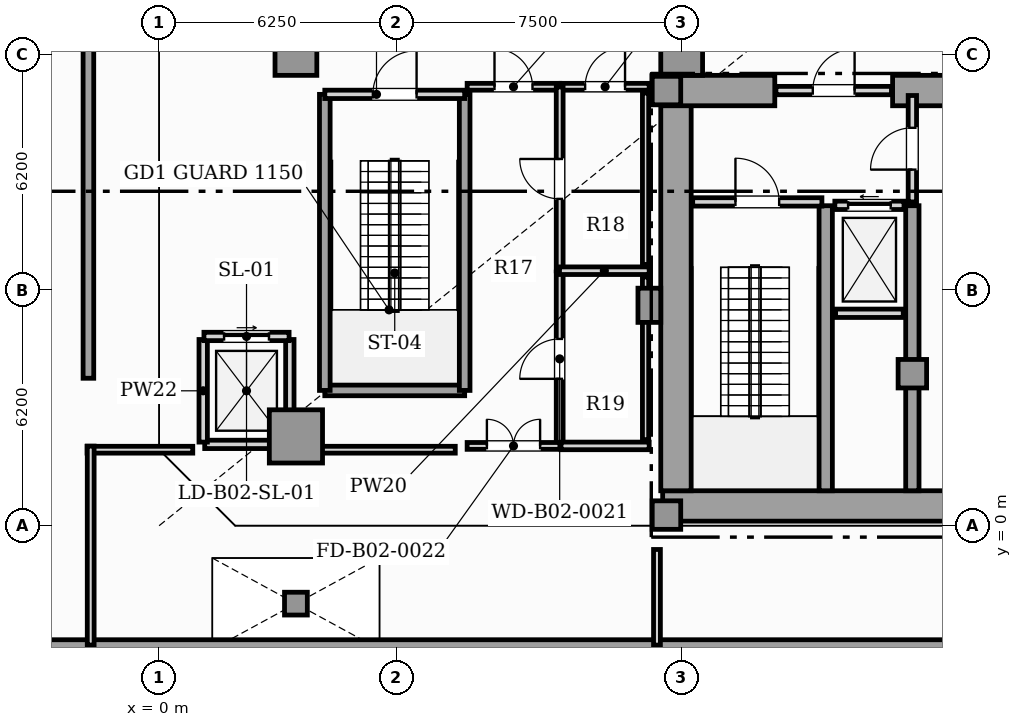
"""IFC4 building model, lengths in metres.
Left out: names, types, materials, properties, quantities, classifications, styles, units other than length and angle.
Written with IfcOpenShell. Run it as: python <this file> out.ifc"""

import sys

from ifc_helpers import new_model, si_unit, direction, frame, frame_2d, origin, origin_2d, place, context, subcontext, project, spatial, rectangle, hollow_rectangle, extrude, element, fill, save


model = new_model("IFC4")
c1 = context("Model", 3, precision=1e-05, world=origin(), true_north=direction((0.0, 1.0)))
c2 = subcontext(c1, "Body", "Model", "MODEL_VIEW")
j1 = project(units=[si_unit("LENGTHUNIT", "METRE"), si_unit("PLANEANGLEUNIT", "RADIAN")], contexts=[c1])
p1 = place(None, origin())
s1 = spatial("IfcSite", under=j1, at=p1, CompositionType="ELEMENT")
p2 = place(p1, origin())
s2 = spatial("IfcBuilding", under=s1, at=p2, CompositionType="ELEMENT")
p3 = place(p2, frame((0.0, 0.0, -10.8)))
s3 = spatial("IfcBuildingStorey", under=s2, at=p3, CompositionType="ELEMENT", Elevation=-10.8)
p4 = place(p3, frame((13.25, 0.52, 0.0), z_axis=(0.0, 0.0, 1.0), x_axis=(1.0, 0.0, 0.0)))
e1 = element("IfcWall", 1, at=p4, inside=s3, PredefinedType="SHEAR", context=c2, shape_type="SweptSolid", body=[
    extrude(rectangle(XDim=31.0, YDim=0.8, at=frame_2d((15.5, 0.0))), origin(), (0.0, 0.0, 1.0), 5.05),
])
p5 = place(p3, frame((13.6, 0.92, 0.0), z_axis=(0.0, 0.0, 1.0), x_axis=(0.0, 1.0, 0.0)))
e2 = element("IfcWall", 2, at=p5, inside=s3, PredefinedType="SHEAR", context=c2, shape_type="SweptSolid", body=[
    extrude(rectangle(XDim=10.53, YDim=0.8, at=frame_2d((5.265, 0.0))), origin(), (0.0, 0.0, 1.0), 5.05),
])
p6 = place(p3, frame((13.25, 11.45, 0.0), z_axis=(0.0, 0.0, 1.0), x_axis=(1.0, 0.0, 0.0)))
e3 = element("IfcWall", 3, at=p6, inside=s3, PredefinedType="SHEAR", context=c2, shape_type="SweptSolid", body=[
    extrude(rectangle(XDim=2.95, YDim=0.8, at=frame_2d((1.475, 0.0))), origin(), (0.0, 0.0, 1.0), 5.05),
])
p7 = place(p3, frame((19.3, 11.45, 0.0), z_axis=(0.0, 0.0, 1.0), x_axis=(1.0, 0.0, 0.0)))
e4 = element("IfcWall", 4, at=p7, inside=s3, PredefinedType="SHEAR", context=c2, shape_type="SweptSolid", body=[
    extrude(rectangle(XDim=7.3, YDim=0.8, at=frame_2d((3.65, 0.0))), origin(), (0.0, 0.0, 1.0), 5.05),
])
for number, where, z_axis, x_axis in (
    (5, (17.54, 0.92, 0.0), (0.0, 0.0, 1.0), (0.0, 1.0, 0.0)),
    (6, (19.82, 0.92, 0.0), (0.0, 0.0, 1.0), (0.0, 1.0, 0.0)),
):
    element("IfcWall", number, at=place(p3, frame(where, z_axis=z_axis, x_axis=x_axis)), inside=s3, PredefinedType="SHEAR", context=c2, shape_type="SweptSolid", body=[
        extrude(rectangle(XDim=7.5, YDim=0.35, at=frame_2d((3.75, 0.0))), origin(), (0.0, 0.0, 1.0), 5.05),
    ])
p8 = place(p3, frame((12.9, 5.8, 0.0), z_axis=(0.0, 0.0, 1.0), x_axis=(1.0, 0.0, 0.0)))
e7 = element("IfcColumn", 7, at=p8, inside=s3, PredefinedType="PILASTER", context=c2, shape_type="SweptSolid", body=[
    extrude(rectangle(XDim=0.6, YDim=0.9, at=origin_2d()), origin(), (0.0, 0.0, 1.0), 5.4),
])
p9 = place(p3, frame((-7.9, -3.3, 0.0), z_axis=(0.0, 0.0, 1.0), x_axis=(1.0, 0.0, 0.0)))
e8 = element("IfcWall", 8, at=p9, inside=s3, PredefinedType="SOLIDWALL", context=c2, shape_type="SweptSolid", body=[
    extrude(rectangle(XDim=74.6, YDim=0.6, at=frame_2d((37.3, 0.0))), origin(), (0.0, 0.0, 1.0), 5.05),
])
p10 = place(p3, frame((-1.86, 3.88, 0.0), z_axis=(0.0, 0.0, 1.0), x_axis=(0.0, 1.0, 0.0)))
e9 = element("IfcWall", 9, at=p10, inside=s3, PredefinedType="SHEAR", context=c2, shape_type="SweptSolid", body=[
    extrude(rectangle(XDim=34.27, YDim=0.28, at=frame_2d((17.135, 0.0))), origin(), (0.0, 0.0, 1.0), 5.05),
])
for number, where, z_axis, x_axis in (
    (10, (13.35, 0.28, 0.0), (0.0, 0.0, 1.0), (1.0, 0.0, 0.0)),
    (11, (13.35, 11.45, 0.0), (0.0, 0.0, 1.0), (1.0, 0.0, 0.0)),
    (12, (19.82, 4.0, 0.0), (0.0, 0.0, 1.0), (1.0, 0.0, 0.0)),
):
    element("IfcColumn", number, at=place(p3, frame(where, z_axis=z_axis, x_axis=x_axis)), inside=s3, PredefinedType="COLUMN", context=c2, shape_type="SweptSolid", body=[
        extrude(rectangle(XDim=0.75, YDim=0.75, at=origin_2d()), origin(), (0.0, 0.0, 1.0), 5.4),
    ])
p11 = place(p3, frame((3.6, 2.35, 0.0), z_axis=(0.0, 0.0, 1.0), x_axis=(1.0, 0.0, 0.0)))
e13 = element("IfcColumn", 13, at=p11, inside=s3, PredefinedType="USERDEFINED", context=c2, shape_type="SweptSolid", body=[
    extrude(hollow_rectangle(XDim=1.4, YDim=1.4, WallThickness=0.08, at=origin_2d()), origin(), (0.0, 0.0, 1.0), 5.4),
])
for number, where, z_axis, x_axis in (
    (14, (3.6, 12.4, 0.0), (0.0, 0.0, 1.0), (1.0, 0.0, 0.0)),
    (15, (13.75, 12.4, 0.0), (0.0, 0.0, 1.0), (1.0, 0.0, 0.0)),
):
    element("IfcColumn", number, at=place(p3, frame(where, z_axis=z_axis, x_axis=x_axis)), inside=s3, PredefinedType="COLUMN", context=c2, shape_type="SweptSolid", body=[
        extrude(rectangle(XDim=1.1, YDim=1.1, at=origin_2d()), origin(), (0.0, 0.0, 1.0), 5.4),
    ])
p12 = place(p3, frame((3.6, -2.05, 0.0), z_axis=(0.0, 0.0, 1.0), x_axis=(1.0, 0.0, 0.0)))
e16 = element("IfcColumn", 16, at=p12, inside=s3, PredefinedType="COLUMN", context=c2, shape_type="SweptSolid", body=[
    extrude(hollow_rectangle(XDim=0.6, YDim=0.6, WallThickness=0.04, at=origin_2d()), origin(), (0.0, 0.0, 1.0), 5.4),
])
p13 = place(p3, frame((17.8, 5.59, 0.0), z_axis=(0.0, 0.0, 1.0), x_axis=(1.0, 0.0, 0.0)))
e17 = element("IfcWall", 17, at=p13, inside=s3, PredefinedType="SOLIDWALL", context=c2, shape_type="SweptSolid", body=[
    extrude(rectangle(XDim=1.78, YDim=0.22, at=frame_2d((0.89, 0.0))), origin(), (0.0, 0.0, 1.0), 5.05),
])
p14 = place(p3, frame((17.78, 8.43, 0.0), z_axis=(0.0, 0.0, 1.0), x_axis=(1.0, 0.0, 0.0)))
e18 = element("IfcWall", 18, at=p14, inside=s3, PredefinedType="SOLIDWALL", context=c2, shape_type="SweptSolid", body=[
    extrude(rectangle(XDim=1.82, YDim=0.22, at=frame_2d((0.91, 0.0))), origin(), (0.0, 0.0, 1.0), 5.05),
])
p15 = place(p14, frame((0.35, 0.0, 0.0)))
e19 = element("IfcOpeningElement", 19, at=p15, cuts=e18, PredefinedType="OPENING", context=c2, shape_type="SweptSolid", body=[
    extrude(rectangle(XDim=1.12, YDim=2.25, at=frame_2d((0.56, 1.125))), frame((0.0, 0.12, 0.0), z_axis=(0.0, -1.0, 0.0), x_axis=(1.0, 0.0, 0.0)), (0.0, 0.0, 1.0), 0.24),
])
p16 = place(p3, frame((1.2, 2.14, 0.0), z_axis=(0.0, 0.0, 1.0), x_axis=(1.0, 0.0, 0.0)))
e20 = element("IfcWall", 20, at=p16, inside=s3, PredefinedType="SOLIDWALL", context=c2, shape_type="SweptSolid", body=[
    extrude(rectangle(XDim=2.2, YDim=0.22, at=frame_2d((1.1, 0.0))), origin(), (0.0, 0.0, 1.0), 5.05),
])
p17 = place(p3, frame((1.16, 2.2, 0.0), z_axis=(0.0, 0.0, 1.0), x_axis=(0.0, 1.0, 0.0)))
e21 = element("IfcWall", 21, at=p17, inside=s3, PredefinedType="SOLIDWALL", context=c2, shape_type="SweptSolid", body=[
    extrude(rectangle(XDim=2.7, YDim=0.22, at=frame_2d((1.35, 0.0))), origin(), (0.0, 0.0, 1.0), 5.05),
])
p18 = place(p3, frame((3.44, 2.2, 0.0), z_axis=(0.0, 0.0, 1.0), x_axis=(0.0, 1.0, 0.0)))
e22 = element("IfcWall", 22, at=p18, inside=s3, PredefinedType="SOLIDWALL", context=c2, shape_type="SweptSolid", body=[
    extrude(rectangle(XDim=2.7, YDim=0.22, at=frame_2d((1.35, 0.0))), origin(), (0.0, 0.0, 1.0), 4.433),
])
p19 = place(p3, frame((1.18, 4.98, 0.0), z_axis=(0.0, 0.0, 1.0), x_axis=(1.0, 0.0, 0.0)))
e23 = element("IfcWall", 23, at=p19, inside=s3, PredefinedType="SOLIDWALL", context=c2, shape_type="SweptSolid", body=[
    extrude(rectangle(XDim=2.24, YDim=0.22, at=frame_2d((1.12, 0.0))), origin(), (0.0, 0.0, 1.0), 5.05),
])
p20 = place(p19, frame((0.53, 0.0, 0.0)))
e24 = element("IfcOpeningElement", 24, at=p20, cuts=e23, PredefinedType="OPENING", context=c2, shape_type="SweptSolid", body=[
    extrude(rectangle(XDim=1.18, YDim=2.2, at=frame_2d((0.59, 1.1))), frame((0.0, 0.12, 0.0), z_axis=(0.0, -1.0, 0.0), x_axis=(1.0, 0.0, 0.0)), (0.0, 0.0, 1.0), 0.24),
])
p21 = place(p3, frame((14.04, 8.52, 0.0), z_axis=(0.0, 0.0, 1.0), x_axis=(1.0, 0.0, 0.0)))
e25 = element("IfcWall", 25, at=p21, inside=s3, PredefinedType="SOLIDWALL", context=c2, shape_type="SweptSolid", body=[
    extrude(rectangle(XDim=3.4, YDim=0.22, at=frame_2d((1.7, 0.0))), origin(), (0.0, 0.0, 1.0), 5.05),
])
p22 = place(p21, frame((1.125, 0.0, 0.0)))
e26 = element("IfcOpeningElement", 26, at=p22, cuts=e25, PredefinedType="OPENING", context=c2, shape_type="SweptSolid", body=[
    extrude(rectangle(XDim=1.15, YDim=2.2, at=frame_2d((0.575, 1.1))), frame((0.0, 0.12, 0.0), z_axis=(0.0, -1.0, 0.0), x_axis=(1.0, 0.0, 0.0)), (0.0, 0.0, 1.0), 0.24),
])
p23 = place(p3, frame((4.36, 3.56, 0.0), z_axis=(0.0, 0.0, 1.0), x_axis=(1.0, 0.0, 0.0)))
e27 = element("IfcWall", 27, at=p23, inside=s3, PredefinedType="SHEAR", context=c2, shape_type="SweptSolid", body=[
    extrude(rectangle(XDim=3.68, YDim=0.28, at=frame_2d((1.84, 0.0))), origin(), (0.0, 0.0, 1.0), 5.05),
])
for number, where, z_axis, x_axis in (
    (28, (4.36, 3.56, 0.0), (0.0, 0.0, 1.0), (0.0, 1.0, 0.0)),
    (29, (8.04, 3.56, 0.0), (0.0, 0.0, 1.0), (0.0, 1.0, 0.0)),
):
    element("IfcWall", number, at=place(p3, frame(where, z_axis=z_axis, x_axis=x_axis)), inside=s3, PredefinedType="SHEAR", context=c2, shape_type="SweptSolid", body=[
        extrude(rectangle(XDim=7.79, YDim=0.28, at=frame_2d((3.895, 0.0))), origin(), (0.0, 0.0, 1.0), 5.05),
    ])
p24 = place(p3, frame((4.36, 11.35, 0.0), z_axis=(0.0, 0.0, 1.0), x_axis=(1.0, 0.0, 0.0)))
e30 = element("IfcWall", 30, at=p24, inside=s3, PredefinedType="SOLIDWALL", context=c2, shape_type="SweptSolid", body=[
    extrude(rectangle(XDim=3.68, YDim=0.22, at=frame_2d((1.84, 0.0))), origin(), (0.0, 0.0, 1.0), 5.05),
])
p25 = place(p24, frame((1.265, 0.0, 0.0)))
e31 = element("IfcOpeningElement", 31, at=p25, cuts=e30, PredefinedType="OPENING", context=c2, shape_type="SweptSolid", body=[
    extrude(rectangle(XDim=1.15, YDim=2.2, at=frame_2d((0.575, 1.1))), frame((0.0, 0.12, 0.0), z_axis=(0.0, -1.0, 0.0), x_axis=(1.0, 0.0, 0.0)), (0.0, 0.0, 1.0), 0.24),
])
p26 = place(p3, frame((19.82, 8.52, 0.0), z_axis=(0.0, 0.0, 1.0), x_axis=(0.0, 1.0, 0.0)))
e32 = element("IfcWall", 32, at=p26, inside=s3, PredefinedType="SOLIDWALL", context=c2, shape_type="SweptSolid", body=[
    extrude(rectangle(XDim=2.8, YDim=0.22, at=frame_2d((1.4, 0.0))), origin(), (0.0, 0.0, 1.0), 4.506),
])
p27 = place(p26, frame((0.85, 0.0, 0.0)))
e33 = element("IfcOpeningElement", 33, at=p27, cuts=e32, PredefinedType="OPENING", context=c2, shape_type="SweptSolid", body=[
    extrude(rectangle(XDim=1.1, YDim=2.2, at=frame_2d((0.55, 1.1))), frame((0.0, 0.12, 0.0), z_axis=(0.0, -1.0, 0.0), x_axis=(1.0, 0.0, 0.0)), (0.0, 0.0, 1.0), 0.24),
])
p28 = place(p3, frame((16.23, 11.45, 0.0), z_axis=(0.0, 0.0, 1.0), x_axis=(1.0, 0.0, 0.0)))
e34 = element("IfcWall", 34, at=p28, inside=s3, PredefinedType="SOLIDWALL", context=c2, shape_type="SweptSolid", body=[
    extrude(rectangle(XDim=3.04, YDim=0.22, at=frame_2d((1.52, 0.0))), origin(), (0.0, 0.0, 1.0), 5.05),
])
p29 = place(p28, frame((0.97, 0.0, 0.0)))
e35 = element("IfcOpeningElement", 35, at=p29, cuts=e34, PredefinedType="OPENING", context=c2, shape_type="SweptSolid", body=[
    extrude(rectangle(XDim=1.1, YDim=2.2, at=frame_2d((0.55, 1.1))), frame((0.0, 0.12, 0.0), z_axis=(0.0, -1.0, 0.0), x_axis=(1.0, 0.0, 0.0)), (0.0, 0.0, 1.0), 0.24),
])
p30 = place(p3, frame((8.105, 11.55, 0.0), z_axis=(0.0, 0.0, 1.0), x_axis=(1.0, 0.0, 0.0)))
e36 = element("IfcWall", 36, at=p30, inside=s3, PredefinedType="PARTITIONING", context=c2, shape_type="SweptSolid", body=[
    extrude(rectangle(XDim=2.44, YDim=0.18, at=frame_2d((1.22, 0.0))), origin(), (0.0, 0.0, 1.0), 5.05),
])
p31 = place(p30, frame((0.72, 0.0, 0.0)))
e37 = element("IfcOpeningElement", 37, at=p31, cuts=e36, PredefinedType="OPENING", context=c2, shape_type="SweptSolid", body=[
    extrude(rectangle(XDim=1.0, YDim=2.15, at=frame_2d((0.5, 1.075))), frame((0.0, 0.1, 0.0), z_axis=(0.0, -1.0, 0.0), x_axis=(1.0, 0.0, 0.0)), (0.0, 0.0, 1.0), 0.2),
])
p32 = place(p3, frame((10.575, 11.55, 0.0), z_axis=(0.0, 0.0, 1.0), x_axis=(1.0, 0.0, 0.0)))
e38 = element("IfcWall", 38, at=p32, inside=s3, PredefinedType="PARTITIONING", context=c2, shape_type="SweptSolid", body=[
    extrude(rectangle(XDim=2.32, YDim=0.18, at=frame_2d((1.16, 0.0))), origin(), (0.0, 0.0, 1.0), 5.05),
])
p33 = place(p32, frame((0.635, 0.0, 0.0)))
e39 = element("IfcOpeningElement", 39, at=p33, cuts=e38, PredefinedType="OPENING", context=c2, shape_type="SweptSolid", body=[
    extrude(rectangle(XDim=1.05, YDim=2.15, at=frame_2d((0.525, 1.075))), frame((0.0, 0.1, 0.0), z_axis=(0.0, -1.0, 0.0), x_axis=(1.0, 0.0, 0.0)), (0.0, 0.0, 1.0), 0.2),
])
p34 = place(p3, frame((10.54, 6.705, 0.0), z_axis=(0.0, 0.0, 1.0), x_axis=(0.0, 1.0, 0.0)))
e40 = element("IfcWall", 40, at=p34, inside=s3, PredefinedType="PARTITIONING", context=c2, shape_type="SweptSolid", body=[
    extrude(rectangle(XDim=4.84, YDim=0.18, at=frame_2d((2.42, 0.0))), origin(), (0.0, 0.0, 1.0), 5.05),
])
p35 = place(p34, frame((1.895, 0.0, 0.0)))
e41 = element("IfcOpeningElement", 41, at=p35, cuts=e40, PredefinedType="OPENING", context=c2, shape_type="SweptSolid", body=[
    extrude(rectangle(XDim=1.05, YDim=2.15, at=frame_2d((0.525, 1.075))), frame((0.0, 0.1, 0.0), z_axis=(0.0, -1.0, 0.0), x_axis=(1.0, 0.0, 0.0)), (0.0, 0.0, 1.0), 0.2),
])
p36 = place(p3, frame((10.54, 2.105, 0.0), z_axis=(0.0, 0.0, 1.0), x_axis=(0.0, 1.0, 0.0)))
e42 = element("IfcWall", 42, at=p36, inside=s3, PredefinedType="PARTITIONING", context=c2, shape_type="SweptSolid", body=[
    extrude(rectangle(XDim=4.57, YDim=0.18, at=frame_2d((2.285, 0.0))), origin(), (0.0, 0.0, 1.0), 5.05),
])
p37 = place(p36, frame((1.76, 0.0, 0.0)))
e43 = element("IfcOpeningElement", 43, at=p37, cuts=e42, PredefinedType="OPENING", context=c2, shape_type="SweptSolid", body=[
    extrude(rectangle(XDim=1.05, YDim=2.15, at=frame_2d((0.525, 1.075))), frame((0.0, 0.1, 0.0), z_axis=(0.0, -1.0, 0.0), x_axis=(1.0, 0.0, 0.0)), (0.0, 0.0, 1.0), 0.2),
])
p38 = place(p3, frame((8.105, 2.1, 0.0), z_axis=(0.0, 0.0, 1.0), x_axis=(1.0, 0.0, 0.0)))
e44 = element("IfcWall", 44, at=p38, inside=s3, PredefinedType="PARTITIONING", context=c2, shape_type="SweptSolid", body=[
    extrude(rectangle(XDim=2.44, YDim=0.18, at=frame_2d((1.22, 0.0))), origin(), (0.0, 0.0, 1.0), 5.05),
])
p39 = place(p38, frame((0.52, 0.0, 0.0)))
e45 = element("IfcOpeningElement", 45, at=p39, cuts=e44, PredefinedType="OPENING", context=c2, shape_type="SweptSolid", body=[
    extrude(rectangle(XDim=1.4, YDim=2.2, at=frame_2d((0.7, 1.1))), frame((0.0, 0.1, 0.0), z_axis=(0.0, -1.0, 0.0), x_axis=(1.0, 0.0, 0.0)), (0.0, 0.0, 1.0), 0.2),
])
p40 = place(p3, frame((10.535, 6.71, 0.0), z_axis=(0.0, 0.0, 1.0), x_axis=(1.0, 0.0, 0.0)))
e46 = element("IfcWall", 46, at=p40, inside=s3, PredefinedType="PARTITIONING", context=c2, shape_type="SweptSolid", body=[
    extrude(rectangle(XDim=2.36, YDim=0.2, at=frame_2d((1.18, 0.0))), origin(), (0.0, 0.0, 1.0), 5.05),
])
p41 = place(p3, frame((10.575, 2.1, 0.0), z_axis=(0.0, 0.0, 1.0), x_axis=(1.0, 0.0, 0.0)))
e47 = element("IfcWall", 47, at=p41, inside=s3, PredefinedType="PARTITIONING", context=c2, shape_type="SweptSolid", body=[
    extrude(rectangle(XDim=2.32, YDim=0.2, at=frame_2d((1.16, 0.0))), origin(), (0.0, 0.0, 1.0), 5.05),
])
p42 = place(p3, frame((12.8, 6.875, 0.0), z_axis=(0.0, 0.0, 1.0), x_axis=(0.0, 1.0, 0.0)))
e48 = element("IfcWall", 48, at=p42, inside=s3, PredefinedType="PLUMBINGWALL", context=c2, shape_type="SweptSolid", body=[
    extrude(rectangle(XDim=4.51, YDim=0.165, at=frame_2d((2.255, 0.0))), origin(), (0.0, 0.0, 1.0), 5.05),
])
p43 = place(p3, frame((12.8, 2.265, 0.0), z_axis=(0.0, 0.0, 1.0), x_axis=(0.0, 1.0, 0.0)))
e49 = element("IfcWall", 49, at=p43, inside=s3, PredefinedType="PLUMBINGWALL", context=c2, shape_type="SweptSolid", body=[
    extrude(rectangle(XDim=4.28, YDim=0.165, at=frame_2d((2.14, 0.0))), origin(), (0.0, 0.0, 1.0), 5.05),
])
p44 = place(p3, frame((13.1, -3.14, 0.0), z_axis=(0.0, 0.0, 1.0), x_axis=(0.0, 1.0, 0.0)))
e50 = element("IfcWall", 50, at=p44, inside=s3, PredefinedType="PARTITIONING", context=c2, shape_type="SweptSolid", body=[
    extrude(rectangle(XDim=2.515, YDim=0.18, at=frame_2d((1.257, 0.0))), origin(), (0.0, 0.0, 1.0), 5.05),
])
p45 = place(p3, frame((7.792, 2.0, 0.0), z_axis=(0.0, 0.0, 1.0), x_axis=(-1.0, 0.0, 0.0)))
e51 = element("IfcWall", 51, at=p45, inside=s3, PredefinedType="PARTITIONING", context=c2, shape_type="SweptSolid", body=[
    extrude(rectangle(XDim=4.078, YDim=0.18, at=frame_2d((2.039, 0.0))), origin(), (0.0, 0.0, 1.0), 5.05),
])
p46 = place(p3, frame((0.886, 2.0, 0.0), z_axis=(0.0, 0.0, 1.0), x_axis=(-1.0, 0.0, 0.0)))
e52 = element("IfcWall", 52, at=p46, inside=s3, PredefinedType="PARTITIONING", context=c2, shape_type="SweptSolid", body=[
    extrude(rectangle(XDim=2.781, YDim=0.18, at=frame_2d((1.39, 0.0))), origin(), (0.0, 0.0, 1.0), 5.05),
])
p47 = place(p3, frame((-1.8, 2.095, 0.0), z_axis=(0.0, 0.0, 1.0), x_axis=(0.0, -1.0, 0.0)))
e53 = element("IfcWall", 53, at=p47, inside=s3, PredefinedType="PARTITIONING", context=c2, shape_type="SweptSolid", body=[
    extrude(rectangle(XDim=5.235, YDim=0.18, at=frame_2d((2.617, 0.0))), origin(), (0.0, 0.0, 1.0), 5.05),
])
p48 = place(p15, origin())
e54 = element("IfcDoor", 54, at=p48, inside=s3, OperationType="SLIDING_TO_LEFT", PredefinedType="DOOR", context=c2, shape_type="SweptSolid", body=[
    extrude(rectangle(XDim=1.12, YDim=2.25, at=frame_2d((0.56, 1.125))), frame((0.0, 0.025, 0.0), z_axis=(0.0, -1.0, 0.0), x_axis=(1.0, 0.0, 0.0)), (0.0, 0.0, 1.0), 0.05),
])
fill(e19, e54)
p49 = place(p20, origin())
e55 = element("IfcDoor", 55, at=p49, inside=s3, OperationType="SLIDING_TO_RIGHT", PredefinedType="DOOR", context=c2, shape_type="SweptSolid", body=[
    extrude(rectangle(XDim=1.18, YDim=2.2, at=frame_2d((0.59, 1.1))), frame((0.0, 0.025, 0.0), z_axis=(0.0, -1.0, 0.0), x_axis=(1.0, 0.0, 0.0)), (0.0, 0.0, 1.0), 0.05),
])
fill(e24, e55)
p50 = place(p22, origin())
e56 = element("IfcDoor", 56, at=p50, inside=s3, OperationType="SINGLE_SWING_LEFT", PredefinedType="DOOR", context=c2, shape_type="SweptSolid", body=[
    extrude(rectangle(XDim=1.15, YDim=2.2, at=frame_2d((0.575, 1.1))), frame((0.0, 0.025, 0.0), z_axis=(0.0, -1.0, 0.0), x_axis=(1.0, 0.0, 0.0)), (0.0, 0.0, 1.0), 0.05),
])
fill(e26, e56)
p51 = place(p25, origin())
e57 = element("IfcDoor", 57, at=p51, inside=s3, OperationType="SINGLE_SWING_RIGHT", PredefinedType="DOOR", context=c2, shape_type="SweptSolid", body=[
    extrude(rectangle(XDim=1.15, YDim=2.2, at=frame_2d((0.575, 1.1))), frame((0.0, 0.025, 0.0), z_axis=(0.0, -1.0, 0.0), x_axis=(1.0, 0.0, 0.0)), (0.0, 0.0, 1.0), 0.05),
])
fill(e31, e57)
p52 = place(p27, origin())
e58 = element("IfcDoor", 58, at=p52, inside=s3, OperationType="SINGLE_SWING_LEFT", PredefinedType="DOOR", context=c2, shape_type="SweptSolid", body=[
    extrude(rectangle(XDim=1.1, YDim=2.2, at=frame_2d((0.55, 1.1))), frame((0.0, 0.025, 0.0), z_axis=(0.0, -1.0, 0.0), x_axis=(1.0, 0.0, 0.0)), (0.0, 0.0, 1.0), 0.05),
])
fill(e33, e58)
p53 = place(p29, origin())
e59 = element("IfcDoor", 59, at=p53, inside=s3, OperationType="SINGLE_SWING_RIGHT", PredefinedType="DOOR", context=c2, shape_type="SweptSolid", body=[
    extrude(rectangle(XDim=1.1, YDim=2.2, at=frame_2d((0.55, 1.1))), frame((0.0, 0.025, 0.0), z_axis=(0.0, -1.0, 0.0), x_axis=(1.0, 0.0, 0.0)), (0.0, 0.0, 1.0), 0.05),
])
fill(e35, e59)
p54 = place(p31, origin())
e60 = element("IfcDoor", 60, at=p54, inside=s3, OperationType="SINGLE_SWING_LEFT", PredefinedType="DOOR", context=c2, shape_type="SweptSolid", body=[
    extrude(rectangle(XDim=1.0, YDim=2.15, at=frame_2d((0.5, 1.075))), frame((0.0, 0.025, 0.0), z_axis=(0.0, -1.0, 0.0), x_axis=(1.0, 0.0, 0.0)), (0.0, 0.0, 1.0), 0.05),
])
fill(e37, e60)
p55 = place(p33, origin())
e61 = element("IfcDoor", 61, at=p55, inside=s3, OperationType="SINGLE_SWING_RIGHT", PredefinedType="DOOR", context=c2, shape_type="SweptSolid", body=[
    extrude(rectangle(XDim=1.05, YDim=2.15, at=frame_2d((0.525, 1.075))), frame((0.0, 0.025, 0.0), z_axis=(0.0, -1.0, 0.0), x_axis=(1.0, 0.0, 0.0)), (0.0, 0.0, 1.0), 0.05),
])
fill(e39, e61)
p56 = place(p35, origin())
e62 = element("IfcDoor", 62, at=p56, inside=s3, OperationType="SINGLE_SWING_RIGHT", PredefinedType="DOOR", context=c2, shape_type="SweptSolid", body=[
    extrude(rectangle(XDim=1.05, YDim=2.15, at=frame_2d((0.525, 1.075))), frame((0.0, 0.025, 0.0), z_axis=(0.0, -1.0, 0.0), x_axis=(1.0, 0.0, 0.0)), (0.0, 0.0, 1.0), 0.05),
])
fill(e41, e62)
p57 = place(p37, origin())
e63 = element("IfcDoor", 63, at=p57, inside=s3, OperationType="SINGLE_SWING_LEFT", PredefinedType="DOOR", context=c2, shape_type="SweptSolid", body=[
    extrude(rectangle(XDim=1.05, YDim=2.15, at=frame_2d((0.525, 1.075))), frame((0.0, 0.025, 0.0), z_axis=(0.0, -1.0, 0.0), x_axis=(1.0, 0.0, 0.0)), (0.0, 0.0, 1.0), 0.05),
])
fill(e43, e63)
p58 = place(p39, origin())
e64 = element("IfcDoor", 64, at=p58, inside=s3, OperationType="DOUBLE_DOOR_SINGLE_SWING", PredefinedType="DOOR", context=c2, shape_type="SweptSolid", body=[
    extrude(rectangle(XDim=1.4, YDim=2.2, at=frame_2d((0.7, 1.1))), frame((0.0, 0.025, 0.0), z_axis=(0.0, -1.0, 0.0), x_axis=(1.0, 0.0, 0.0)), (0.0, 0.0, 1.0), 0.05),
])
fill(e45, e64)
save(model, sys.argv[1])
